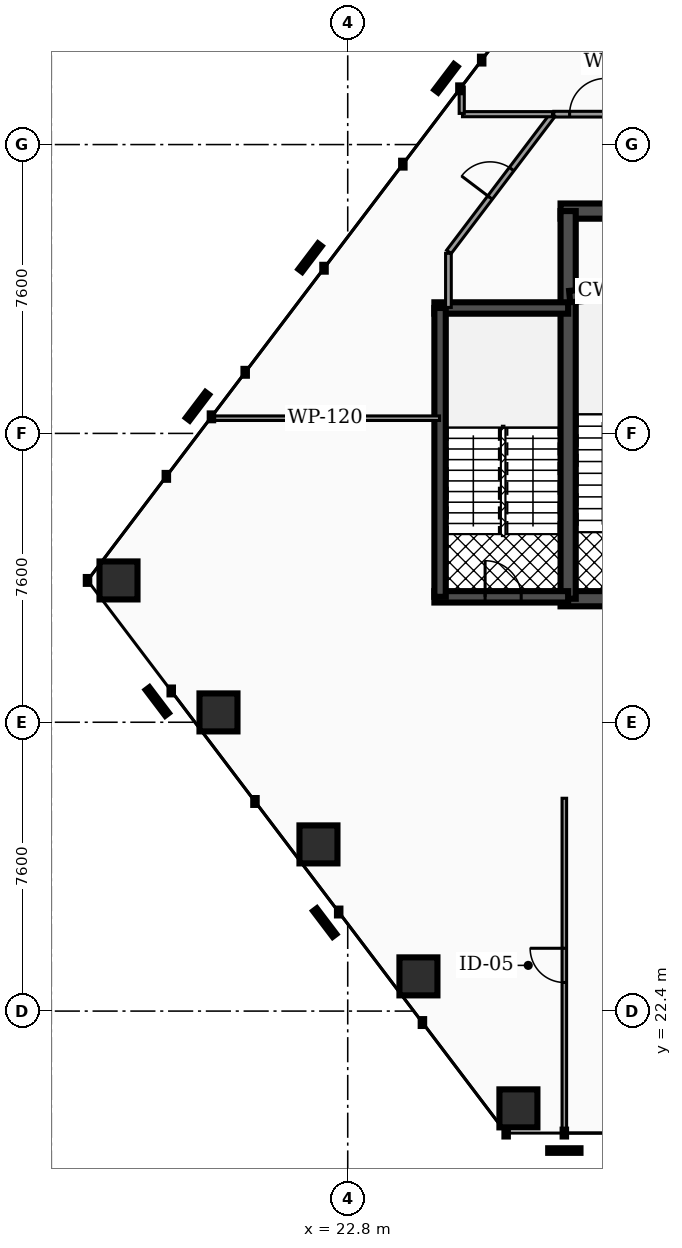
"""IFC4 building model, lengths in metres.
Left out: names, types, materials, properties, quantities, classifications, styles, units other than length and angle.
Written with IfcOpenShell. Run it as: python <this file> out.ifc"""

import sys

from ifc_helpers import new_model, si_unit, direction, frame, frame_2d, origin, origin_2d, place, context, subcontext, project, spatial, rectangle, hollow_rectangle, extrude, element, fill, save


model = new_model("IFC4")
c1 = context("Model", 3, precision=1e-05, world=origin(), true_north=direction((0.0, 1.0)))
c2 = subcontext(c1, "Body", "Model", "MODEL_VIEW")
j1 = project(units=[si_unit("LENGTHUNIT", "METRE"), si_unit("PLANEANGLEUNIT", "RADIAN")], contexts=[c1])
p1 = place(None, origin())
s1 = spatial("IfcSite", under=j1, at=p1, CompositionType="ELEMENT")
p2 = place(p1, origin())
s2 = spatial("IfcBuilding", under=s1, at=p2, CompositionType="ELEMENT")
p3 = place(p2, frame((0.0, 0.0, 35.7)))
s3 = spatial("IfcBuildingStorey", under=s2, at=p3, CompositionType="ELEMENT", Elevation=35.7)
p4 = place(p3, frame((28.4, 43.45, 0.0), z_axis=(0.0, 0.0, 1.0), x_axis=(1.0, 0.0, 0.0)))
e1 = element("IfcWall", 1, at=p4, inside=s3, PredefinedType="SHEAR", context=c2, shape_type="SweptSolid", body=[
    extrude(rectangle(XDim=20.06, YDim=0.4, at=frame_2d((10.03, 0.0))), origin(), (0.0, 0.0, 1.0), 3.82),
])
p5 = place(p3, frame((28.4, 33.25, 0.0), z_axis=(0.0, 0.0, 1.0), x_axis=(1.0, 0.0, 0.0)))
e2 = element("IfcWall", 2, at=p5, inside=s3, PredefinedType="SHEAR", context=c2, shape_type="SweptSolid", body=[
    extrude(rectangle(XDim=20.06, YDim=0.4, at=frame_2d((10.03, 0.0))), origin(), (0.0, 0.0, 1.0), 3.82),
])
p6 = place(p5, frame((4.03, 0.0, 0.0)))
e3 = element("IfcOpeningElement", 3, at=p6, cuts=e2, PredefinedType="OPENING", context=c2, shape_type="SweptSolid", body=[
    extrude(rectangle(XDim=1.1, YDim=2.15, at=frame_2d((0.55, 1.075))), frame((0.0, 0.21, 0.0), z_axis=(0.0, -1.0, 0.0), x_axis=(1.0, 0.0, 0.0)), (0.0, 0.0, 1.0), 0.42),
])
p7 = place(p5, frame((14.87, 0.0, 0.0)))
e4 = element("IfcOpeningElement", 4, at=p7, cuts=e2, PredefinedType="OPENING", context=c2, shape_type="SweptSolid", body=[
    extrude(rectangle(XDim=1.1, YDim=2.15, at=frame_2d((0.55, 1.075))), frame((0.0, 0.21, 0.0), z_axis=(0.0, -1.0, 0.0), x_axis=(1.0, 0.0, 0.0)), (0.0, 0.0, 1.0), 0.42),
])
p8 = place(p5, frame((1.31, 0.0, 0.0)))
e5 = element("IfcOpeningElement", 5, at=p8, cuts=e2, PredefinedType="OPENING", context=c2, shape_type="SweptSolid", body=[
    extrude(rectangle(XDim=1.1, YDim=2.2, at=frame_2d((0.55, 1.1))), frame((0.0, 0.21, 0.0), z_axis=(0.0, -1.0, 0.0), x_axis=(1.0, 0.0, 0.0)), (0.0, 0.0, 1.0), 0.42),
])
p9 = place(p5, frame((9.44, 0.0, 0.0)))
e6 = element("IfcOpeningElement", 6, at=p9, cuts=e2, PredefinedType="OPENING", context=c2, shape_type="SweptSolid", body=[
    extrude(rectangle(XDim=1.12, YDim=2.05, at=frame_2d((0.56, 1.025))), frame((0.0, 0.21, 0.0), z_axis=(0.0, -1.0, 0.0), x_axis=(1.0, 0.0, 0.0)), (0.0, 0.0, 1.0), 0.42),
])
p10 = place(p5, frame((17.65, 0.0, 0.0)))
e7 = element("IfcOpeningElement", 7, at=p10, cuts=e2, PredefinedType="OPENING", context=c2, shape_type="SweptSolid", body=[
    extrude(rectangle(XDim=1.1, YDim=2.2, at=frame_2d((0.55, 1.1))), frame((0.0, 0.21, 0.0), z_axis=(0.0, -1.0, 0.0), x_axis=(1.0, 0.0, 0.0)), (0.0, 0.0, 1.0), 0.42),
])
p11 = place(p3, frame((28.6, 33.25, 0.0), z_axis=(0.0, 0.0, 1.0), x_axis=(0.0, 1.0, 0.0)))
e8 = element("IfcWall", 8, at=p11, inside=s3, PredefinedType="SHEAR", context=c2, shape_type="SweptSolid", body=[
    extrude(rectangle(XDim=10.2, YDim=0.4, at=frame_2d((5.1, 0.0))), origin(), (0.0, 0.0, 1.0), 3.82),
])
p12 = place(p3, frame((28.64, 41.2, 0.0), z_axis=(0.0, 0.0, 1.0), x_axis=(0.995687118776, 0.092774789157, 0.0)))
e9 = element("IfcWall", 9, at=p12, inside=s3, PredefinedType="SHEAR", context=c2, shape_type="SweptSolid", body=[
    extrude(rectangle(XDim=3.234, YDim=0.3, at=frame_2d((1.617, 0.0))), origin(), (0.0, 0.0, 1.0), 3.82),
])
p13 = place(p3, frame((25.08, 40.9, 0.0), z_axis=(0.0, 0.0, 1.0), x_axis=(1.0, 0.0, 0.0)))
e10 = element("IfcWall", 10, at=p13, inside=s3, PredefinedType="SHEAR", context=c2, shape_type="SweptSolid", body=[
    extrude(rectangle(XDim=3.52, YDim=0.3, at=frame_2d((1.76, 0.0))), origin(), (0.0, 0.0, 1.0), 3.82),
])
p14 = place(p3, frame((25.08, 33.3, 0.0), z_axis=(0.0, 0.0, 1.0), x_axis=(1.0, 0.0, 0.0)))
e11 = element("IfcWall", 11, at=p14, inside=s3, PredefinedType="SHEAR", context=c2, shape_type="SweptSolid", body=[
    extrude(rectangle(XDim=3.52, YDim=0.3, at=frame_2d((1.76, 0.0))), origin(), (0.0, 0.0, 1.0), 3.82),
])
p15 = place(p14, frame((1.335, 0.0, 0.0)))
e12 = element("IfcOpeningElement", 12, at=p15, cuts=e11, PredefinedType="OPENING", context=c2, shape_type="SweptSolid", body=[
    extrude(rectangle(XDim=0.95, YDim=2.2, at=frame_2d((0.475, 1.1))), frame((0.0, 0.16, 0.0), z_axis=(0.0, -1.0, 0.0), x_axis=(1.0, 0.0, 0.0)), (0.0, 0.0, 1.0), 0.32),
])
p16 = place(p3, frame((25.23, 33.3, 0.0), z_axis=(0.0, 0.0, 1.0), x_axis=(0.0, 1.0, 0.0)))
e13 = element("IfcWall", 13, at=p16, inside=s3, PredefinedType="SHEAR", context=c2, shape_type="SweptSolid", body=[
    extrude(rectangle(XDim=7.6, YDim=0.3, at=frame_2d((3.8, 0.0))), origin(), (0.0, 0.0, 1.0), 3.82),
])
p17 = place(p3, frame((16.768, 33.731, 0.0), z_axis=(-0.036615829664, 0.12701511847, 0.991224717558), x_axis=(-0.960870208701, -0.276998992833, 0.0)))
e14 = element("IfcColumn", 14, at=p17, inside=s3, PredefinedType="COLUMN", context=c2, shape_type="SweptSolid", body=[
    extrude(hollow_rectangle(XDim=1.0, YDim=1.0, WallThickness=0.05, at=origin_2d()), origin(), (0.0, 0.0, 1.0), 3.854),
])
p18 = place(p3, frame((19.399, 30.259, 0.0), z_axis=(-0.004330178609, 0.084820557464, 0.996386833807), x_axis=(-0.998699436698, -0.050984655928, 0.0)))
e15 = element("IfcColumn", 15, at=p18, inside=s3, PredefinedType="COLUMN", context=c2, shape_type="SweptSolid", body=[
    extrude(hollow_rectangle(XDim=1.0, YDim=1.0, WallThickness=0.05, at=origin_2d()), origin(), (0.0, 0.0, 1.0), 3.834),
])
p19 = place(p3, frame((22.03, 26.786, 0.0), z_axis=(0.028211896517, 0.042126361315, 0.998713902265), x_axis=(-0.830886389581, 0.556442097265, 0.0)))
e16 = element("IfcColumn", 16, at=p19, inside=s3, PredefinedType="COLUMN", context=c2, shape_type="SweptSolid", body=[
    extrude(hollow_rectangle(XDim=1.0, YDim=1.0, WallThickness=0.05, at=origin_2d()), origin(), (0.0, 0.0, 1.0), 3.825),
])
p20 = place(p3, frame((24.661, 23.313, 0.0), z_axis=(0.060666451583, -0.000893091821, 0.998157694976), x_axis=(0.01471975102, 0.999891658596, 0.0)))
e17 = element("IfcColumn", 17, at=p20, inside=s3, PredefinedType="COLUMN", context=c2, shape_type="SweptSolid", body=[
    extrude(hollow_rectangle(XDim=1.0, YDim=1.0, WallThickness=0.05, at=origin_2d()), origin(), (0.0, 0.0, 1.0), 3.827),
])
p21 = place(p3, frame((27.292, 19.84, 0.0), z_axis=(0.092879692396, -0.043610861727, 0.994721798032), x_axis=(0.425021108102, 0.905183438684, 0.0)))
e18 = element("IfcColumn", 18, at=p21, inside=s3, PredefinedType="COLUMN", context=c2, shape_type="SweptSolid", body=[
    extrude(hollow_rectangle(XDim=1.0, YDim=1.0, WallThickness=0.05, at=origin_2d()), origin(), (0.0, 0.0, 1.0), 3.84),
])
p22 = place(p3, frame((28.223, 46.0, 0.0), z_axis=(0.0, 0.0, 1.0), x_axis=(1.0, 0.0, 0.0)))
e19 = element("IfcWall", 19, at=p22, inside=s3, PredefinedType="PARTITIONING", context=c2, shape_type="SweptSolid", body=[
    extrude(rectangle(XDim=1.772, YDim=0.15, at=frame_2d((0.886, 0.0))), origin(), (0.0, 0.0, 1.0), 2.777),
])
p23 = place(p22, frame((0.416, 0.0, 0.0)))
e20 = element("IfcOpeningElement", 20, at=p23, cuts=e19, PredefinedType="OPENING", context=c2, shape_type="SweptSolid", body=[
    extrude(rectangle(XDim=0.94, YDim=2.05, at=frame_2d((0.47, 1.025))), frame((0.0, 0.085, 0.0), z_axis=(0.0, -1.0, 0.0), x_axis=(1.0, 0.0, 0.0)), (0.0, 0.0, 1.0), 0.17),
])
p24 = place(p3, frame((25.45, 40.915, 0.0), z_axis=(0.0, 0.0, 1.0), x_axis=(0.0, 1.0, 0.0)))
e21 = element("IfcWall", 21, at=p24, inside=s3, PredefinedType="PARTITIONING", context=c2, shape_type="SweptSolid", body=[
    extrude(rectangle(XDim=1.425, YDim=0.15, at=frame_2d((0.712, 0.0))), origin(), (0.0, 0.0, 1.0), 2.777),
])
p25 = place(p3, frame((25.462, 42.375, 0.0), z_axis=(0.0, 0.0, 1.0), x_axis=(0.603832768772, 0.797111025741, 0.0)))
e22 = element("IfcWall", 22, at=p25, inside=s3, PredefinedType="PARTITIONING", context=c2, shape_type="SweptSolid", body=[
    extrude(rectangle(XDim=4.527, YDim=0.15, at=frame_2d((2.264, 0.0))), origin(), (0.0, 0.0, 1.0), 2.777),
])
p26 = place(p25, frame((1.793, 0.0, 0.0)))
e23 = element("IfcOpeningElement", 23, at=p26, cuts=e22, PredefinedType="OPENING", context=c2, shape_type="SweptSolid", body=[
    extrude(rectangle(XDim=0.94, YDim=2.05, at=frame_2d((0.47, 1.025))), frame((0.0, 0.085, 0.0), z_axis=(0.0, -1.0, 0.0), x_axis=(1.0, 0.0, 0.0)), (0.0, 0.0, 1.0), 0.17),
])
p27 = place(p3, frame((25.82, 46.0, 0.0), z_axis=(0.0, 0.0, 1.0), x_axis=(1.0, 0.0, 0.0)))
e24 = element("IfcWall", 24, at=p27, inside=s3, PredefinedType="PARTITIONING", context=c2, shape_type="SweptSolid", body=[
    extrude(rectangle(XDim=2.368, YDim=0.135, at=frame_2d((1.184, 0.0))), origin(), (0.0, 0.0, 1.0), 2.777),
])
p28 = place(p3, frame((25.8, 46.02, 0.0), z_axis=(0.0, 0.0, 1.0), x_axis=(0.0, 1.0, 0.0)))
e25 = element("IfcWall", 25, at=p28, inside=s3, PredefinedType="PARTITIONING", context=c2, shape_type="SweptSolid", body=[
    extrude(rectangle(XDim=0.695, YDim=0.135, at=frame_2d((0.347, 0.0))), origin(), (0.0, 0.0, 1.0), 2.777),
])
p29 = place(p3, frame((28.5, 19.205, 0.0), z_axis=(0.0, 0.0, 1.0), x_axis=(0.0, 1.0, 0.0)))
e26 = element("IfcWall", 26, at=p29, inside=s3, PredefinedType="PARTITIONING", context=c2, shape_type="SweptSolid", body=[
    extrude(rectangle(XDim=8.795, YDim=0.12, at=frame_2d((4.397, 0.0))), origin(), (0.0, 0.0, 1.0), 2.777),
])
p30 = place(p29, frame((3.947, 0.0, 0.0)))
e27 = element("IfcOpeningElement", 27, at=p30, cuts=e26, PredefinedType="OPENING", context=c2, shape_type="SweptSolid", body=[
    extrude(rectangle(XDim=0.9, YDim=2.05, at=frame_2d((0.45, 1.025))), frame((0.0, 0.07, 0.0), z_axis=(0.0, -1.0, 0.0), x_axis=(1.0, 0.0, 0.0)), (0.0, 0.0, 1.0), 0.14),
])
p31 = place(p3, frame((19.201, 38.0, 0.0), z_axis=(0.0, 0.0, 1.0), x_axis=(1.0, 0.0, 0.0)))
e28 = element("IfcWall", 28, at=p31, inside=s3, PredefinedType="PARTITIONING", context=c2, shape_type="SweptSolid", body=[
    extrude(rectangle(XDim=6.014, YDim=0.12, at=frame_2d((3.007, 0.0))), origin(), (0.0, 0.0, 1.0), 2.777),
])
p32 = place(p15, origin())
e29 = element("IfcDoor", 29, at=p32, inside=s3, OperationType="SINGLE_SWING_LEFT", PredefinedType="DOOR", context=c2, shape_type="SweptSolid", body=[
    extrude(rectangle(XDim=0.95, YDim=2.2, at=frame_2d((0.475, 1.1))), frame((0.0, 0.025, 0.0), z_axis=(0.0, -1.0, 0.0), x_axis=(1.0, 0.0, 0.0)), (0.0, 0.0, 1.0), 0.05),
])
fill(e12, e29)
p33 = place(p23, origin())
e30 = element("IfcDoor", 30, at=p33, inside=s3, OperationType="SINGLE_SWING_RIGHT", PredefinedType="DOOR", context=c2, shape_type="SweptSolid", body=[
    extrude(rectangle(XDim=0.94, YDim=2.05, at=frame_2d((0.47, 1.025))), frame((0.0, 0.025, 0.0), z_axis=(0.0, -1.0, 0.0), x_axis=(1.0, 0.0, 0.0)), (0.0, 0.0, 1.0), 0.05),
])
fill(e20, e30)
p34 = place(p26, origin())
e31 = element("IfcDoor", 31, at=p34, inside=s3, OperationType="SINGLE_SWING_LEFT", PredefinedType="DOOR", context=c2, shape_type="SweptSolid", body=[
    extrude(rectangle(XDim=0.94, YDim=2.05, at=frame_2d((0.47, 1.025))), frame((0.0, 0.025, 0.0), z_axis=(0.0, -1.0, 0.0), x_axis=(1.0, 0.0, 0.0)), (0.0, 0.0, 1.0), 0.05),
])
fill(e23, e31)
p35 = place(p30, origin())
e32 = element("IfcDoor", 32, at=p35, inside=s3, OperationType="SINGLE_SWING_RIGHT", PredefinedType="DOOR", context=c2, shape_type="SweptSolid", body=[
    extrude(rectangle(XDim=0.9, YDim=2.05, at=frame_2d((0.45, 1.025))), frame((0.0, 0.025, 0.0), z_axis=(0.0, -1.0, 0.0), x_axis=(1.0, 0.0, 0.0)), (0.0, 0.0, 1.0), 0.05),
])
fill(e27, e32)
save(model, sys.argv[1])
